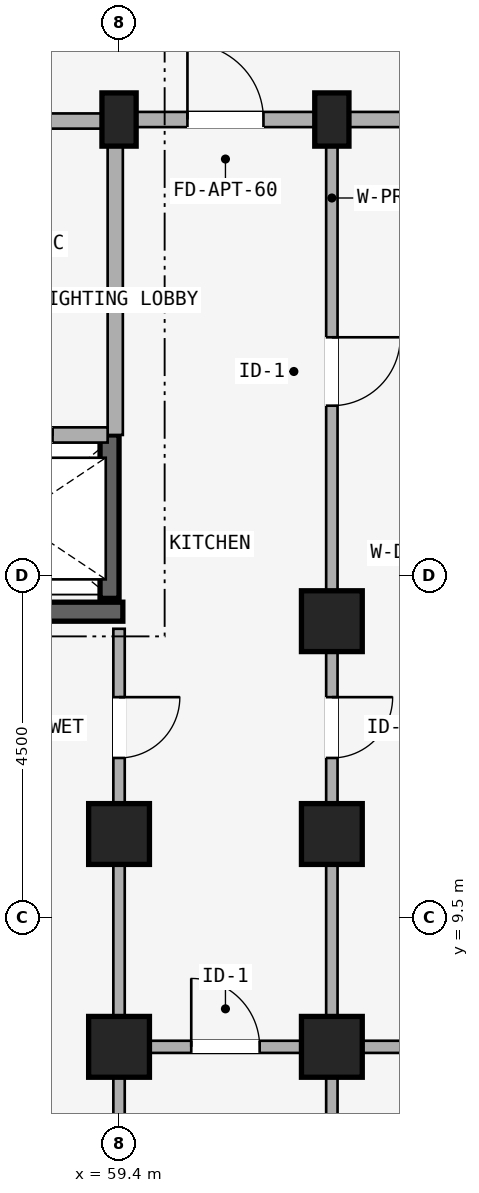
"""IFC4 building model, lengths in metres.
Left out: names, types, materials, properties, quantities, classifications, styles, units other than length and angle.
Written with IfcOpenShell. Run it as: python <this file> out.ifc"""

import sys

from ifc_helpers import new_model, si_unit, direction, frame, frame_2d, origin, origin_2d, place, context, subcontext, project, spatial, rectangle, extrude, element, fill, save


model = new_model("IFC4")
c1 = context("Model", 3, precision=1e-05, world=origin(), true_north=direction((0.0, 1.0)))
c2 = subcontext(c1, "Body", "Model", "MODEL_VIEW")
j1 = project(units=[si_unit("LENGTHUNIT", "METRE"), si_unit("PLANEANGLEUNIT", "RADIAN")], contexts=[c1])
p1 = place(None, origin())
s1 = spatial("IfcSite", under=j1, at=p1, CompositionType="ELEMENT")
p2 = place(p1, origin())
s2 = spatial("IfcBuilding", under=s1, at=p2, CompositionType="ELEMENT")
p3 = place(p2, frame((0.0, 0.0, 11.85)))
s3 = spatial("IfcBuildingStorey", under=s2, at=p3, CompositionType="ELEMENT", Elevation=11.85)
p4 = place(p3, frame((56.65, 13.525, 0.0), z_axis=(0.0, 0.0, 1.0), x_axis=(1.0, 0.0, 0.0)))
e1 = element("IfcWall", 1, at=p4, inside=s3, PredefinedType="SHEAR", context=c2, shape_type="SweptSolid", body=[
    extrude(rectangle(XDim=2.8, YDim=0.25, at=frame_2d((1.4, 0.0))), origin(), (0.0, 0.0, 1.0), 2.93),
])
p5 = place(p3, frame((59.275, 15.85, 0.0), z_axis=(0.0, 0.0, 1.0), x_axis=(0.0, -1.0, 0.0)))
e2 = element("IfcWall", 2, at=p5, inside=s3, PredefinedType="SHEAR", context=c2, shape_type="SweptSolid", body=[
    extrude(rectangle(XDim=2.15, YDim=0.25, at=frame_2d((1.075, 0.0))), origin(), (0.0, 0.0, 1.0), 2.93),
])
p6 = place(p3, frame((59.4, 20.0, 0.0), z_axis=(0.0, 0.0, 1.0), x_axis=(1.0, 0.0, 0.0)))
e3 = element("IfcColumn", 3, at=p6, inside=s3, PredefinedType="COLUMN", context=c2, shape_type="SweptSolid", body=[
    extrude(rectangle(XDim=0.45, YDim=0.7, at=origin_2d()), origin(), (0.0, 0.0, 1.0), 2.93),
])
for number, where, z_axis, x_axis in (
    (4, (59.4, 10.6, 0.0), (0.0, 0.0, 1.0), (1.0, 0.0, 0.0)),
    (5, (59.4, 7.8, 0.0), (0.0, 0.0, 1.0), (1.0, 0.0, 0.0)),
):
    element("IfcColumn", number, at=place(p3, frame(where, z_axis=z_axis, x_axis=x_axis)), inside=s3, PredefinedType="COLUMN", context=c2, shape_type="SweptSolid", body=[
        extrude(rectangle(XDim=0.8, YDim=0.8, at=origin_2d()), origin(), (0.0, 0.0, 1.0), 2.93),
    ])
p7 = place(p3, frame((62.2, 20.0, 0.0), z_axis=(0.0, 0.0, 1.0), x_axis=(1.0, 0.0, 0.0)))
e6 = element("IfcColumn", 6, at=p7, inside=s3, PredefinedType="COLUMN", context=c2, shape_type="SweptSolid", body=[
    extrude(rectangle(XDim=0.45, YDim=0.7, at=origin_2d()), origin(), (0.0, 0.0, 1.0), 2.93),
])
for number, where, z_axis, x_axis in (
    (7, (62.2, 13.4, 0.0), (0.0, 0.0, 1.0), (1.0, 0.0, 0.0)),
    (8, (62.2, 10.6, 0.0), (0.0, 0.0, 1.0), (1.0, 0.0, 0.0)),
    (9, (62.2, 7.8, 0.0), (0.0, 0.0, 1.0), (1.0, 0.0, 0.0)),
):
    element("IfcColumn", number, at=place(p3, frame(where, z_axis=z_axis, x_axis=x_axis)), inside=s3, PredefinedType="COLUMN", context=c2, shape_type="SweptSolid", body=[
        extrude(rectangle(XDim=0.8, YDim=0.8, at=origin_2d()), origin(), (0.0, 0.0, 1.0), 2.93),
    ])
p8 = place(p3, frame((53.7, 19.98, 0.0), z_axis=(0.0, 0.0, 1.0), x_axis=(1.0, 0.0, 0.0)))
e10 = element("IfcWall", 10, at=p8, inside=s3, PredefinedType="STANDARD", context=c2, shape_type="SweptSolid", body=[
    extrude(rectangle(XDim=5.65, YDim=0.2, at=frame_2d((2.825, 0.0))), origin(), (0.0, 0.0, 1.0), 2.372),
])
p9 = place(p8, frame((1.923, 0.0, 0.0)))
e11 = element("IfcOpeningElement", 11, at=p9, cuts=e10, PredefinedType="OPENING", context=c2, shape_type="SweptSolid", body=[
    extrude(rectangle(XDim=1.24, YDim=2.15, at=frame_2d((0.62, 1.075))), frame((0.0, 0.11, 0.0), z_axis=(0.0, -1.0, 0.0), x_axis=(1.0, 0.0, 0.0)), (0.0, 0.0, 1.0), 0.22),
])
p10 = place(p3, frame((59.35, 19.98, 0.0), z_axis=(0.0, 0.0, 1.0), x_axis=(0.0, -1.0, 0.0)))
e12 = element("IfcWall", 12, at=p10, inside=s3, PredefinedType="STANDARD", context=c2, shape_type="SweptSolid", body=[
    extrude(rectangle(XDim=4.13, YDim=0.2, at=frame_2d((2.065, 0.0))), origin(), (0.0, 0.0, 1.0), 2.372),
])
p11 = place(p3, frame((56.7, 15.85, 0.0), z_axis=(0.0, 0.0, 1.0), x_axis=(1.0, 0.0, 0.0)))
e13 = element("IfcWall", 13, at=p11, inside=s3, PredefinedType="STANDARD", context=c2, shape_type="SweptSolid", body=[
    extrude(rectangle(XDim=2.55, YDim=0.2, at=frame_2d((1.275, 0.0))), origin(), (0.0, 0.0, 1.0), 2.372),
])
p12 = place(p11, frame((0.725, 0.0, 0.0)))
e14 = element("IfcOpeningElement", 14, at=p12, cuts=e13, PredefinedType="OPENING", context=c2, shape_type="SweptSolid", body=[
    extrude(rectangle(XDim=1.1, YDim=2.15, at=frame_2d((0.55, 1.075))), frame((0.0, 0.11, 0.0), z_axis=(0.0, -1.0, 0.0), x_axis=(1.0, 0.0, 0.0)), (0.0, 0.0, 1.0), 0.22),
])
p13 = place(p3, frame((59.4, 20.0, 0.0), z_axis=(0.0, 0.0, 1.0), x_axis=(1.0, 0.0, 0.0)))
e15 = element("IfcWall", 15, at=p13, inside=s3, PredefinedType="STANDARD", context=c2, shape_type="SweptSolid", body=[
    extrude(rectangle(XDim=2.8, YDim=0.2, at=frame_2d((1.4, 0.0))), origin(), (0.0, 0.0, 1.0), 2.372),
])
p14 = place(p13, frame((0.9, 0.0, 0.0)))
e16 = element("IfcOpeningElement", 16, at=p14, cuts=e15, PredefinedType="OPENING", context=c2, shape_type="SweptSolid", body=[
    extrude(rectangle(XDim=1.0, YDim=2.15, at=frame_2d((0.5, 1.075))), frame((0.0, 0.11, 0.0), z_axis=(0.0, -1.0, 0.0), x_axis=(1.0, 0.0, 0.0)), (0.0, 0.0, 1.0), 0.22),
])
p15 = place(p3, frame((59.48, 7.8, 0.0), z_axis=(0.0, 0.0, 1.0), x_axis=(1.0, 0.0, 0.0)))
e17 = element("IfcWall", 17, at=p15, inside=s3, PredefinedType="PLUMBINGWALL", context=c2, shape_type="SweptSolid", body=[
    extrude(rectangle(XDim=2.64, YDim=0.16, at=frame_2d((1.32, 0.0))), origin(), (0.0, 0.0, 1.0), 2.372),
])
p16 = place(p15, frame((0.87, 0.0, 0.0)))
e18 = element("IfcOpeningElement", 18, at=p16, cuts=e17, PredefinedType="OPENING", context=c2, shape_type="SweptSolid", body=[
    extrude(rectangle(XDim=0.9, YDim=2.1, at=frame_2d((0.45, 1.05))), frame((0.0, 0.09, 0.0), z_axis=(0.0, -1.0, 0.0), x_axis=(1.0, 0.0, 0.0)), (0.0, 0.0, 1.0), 0.18),
])
p17 = place(p3, frame((62.2, 20.0, 0.0), z_axis=(0.0, 0.0, 1.0), x_axis=(1.0, 0.0, 0.0)))
e19 = element("IfcWall", 19, at=p17, inside=s3, PredefinedType="STANDARD", context=c2, shape_type="SweptSolid", body=[
    extrude(rectangle(XDim=2.8, YDim=0.2, at=frame_2d((1.4, 0.0))), origin(), (0.0, 0.0, 1.0), 2.372),
])
p18 = place(p3, frame((62.28, 7.8, 0.0), z_axis=(0.0, 0.0, 1.0), x_axis=(1.0, 0.0, 0.0)))
e20 = element("IfcWall", 20, at=p18, inside=s3, PredefinedType="PLUMBINGWALL", context=c2, shape_type="SweptSolid", body=[
    extrude(rectangle(XDim=2.64, YDim=0.16, at=frame_2d((1.32, 0.0))), origin(), (0.0, 0.0, 1.0), 2.372),
])
p19 = place(p18, frame((0.92, 0.0, 0.0)))
e21 = element("IfcOpeningElement", 21, at=p19, cuts=e20, PredefinedType="OPENING", context=c2, shape_type="SweptSolid", body=[
    extrude(rectangle(XDim=0.8, YDim=2.1, at=frame_2d((0.4, 1.05))), frame((0.0, 0.09, 0.0), z_axis=(0.0, -1.0, 0.0), x_axis=(1.0, 0.0, 0.0)), (0.0, 0.0, 1.0), 0.18),
])
p20 = place(p3, frame((59.4, 13.3, 0.0), z_axis=(0.0, 0.0, 1.0), x_axis=(0.0, -1.0, 0.0)))
e22 = element("IfcWall", 22, at=p20, inside=s3, PredefinedType="PARTITIONING", context=c2, shape_type="SweptSolid", body=[
    extrude(rectangle(XDim=10.82, YDim=0.15, at=frame_2d((5.41, 0.0))), origin(), (0.0, 0.0, 1.0), 2.372),
])
p21 = place(p20, frame((0.899, 0.0, 0.0)))
e23 = element("IfcOpeningElement", 23, at=p21, cuts=e22, PredefinedType="OPENING", context=c2, shape_type="SweptSolid", body=[
    extrude(rectangle(XDim=0.8, YDim=2.1, at=frame_2d((0.4, 1.05))), frame((0.0, 0.085, 0.0), z_axis=(0.0, -1.0, 0.0), x_axis=(1.0, 0.0, 0.0)), (0.0, 0.0, 1.0), 0.17),
])
p22 = place(p3, frame((62.2, 19.95, 0.0), z_axis=(0.0, 0.0, 1.0), x_axis=(0.0, -1.0, 0.0)))
e24 = element("IfcWall", 24, at=p22, inside=s3, PredefinedType="PARTITIONING", context=c2, shape_type="SweptSolid", body=[
    extrude(rectangle(XDim=6.53, YDim=0.15, at=frame_2d((3.265, 0.0))), origin(), (0.0, 0.0, 1.0), 2.372),
])
p23 = place(p22, frame((2.815, 0.0, 0.0)))
e25 = element("IfcOpeningElement", 25, at=p23, cuts=e24, PredefinedType="OPENING", context=c2, shape_type="SweptSolid", body=[
    extrude(rectangle(XDim=0.9, YDim=2.1, at=frame_2d((0.45, 1.05))), frame((0.0, 0.085, 0.0), z_axis=(0.0, -1.0, 0.0), x_axis=(1.0, 0.0, 0.0)), (0.0, 0.0, 1.0), 0.17),
])
p24 = place(p3, frame((62.2, 13.3, 0.0), z_axis=(0.0, 0.0, 1.0), x_axis=(0.0, -1.0, 0.0)))
e26 = element("IfcWall", 26, at=p24, inside=s3, PredefinedType="PARTITIONING", context=c2, shape_type="SweptSolid", body=[
    extrude(rectangle(XDim=10.82, YDim=0.15, at=frame_2d((5.41, 0.0))), origin(), (0.0, 0.0, 1.0), 2.372),
])
p25 = place(p24, frame((0.899, 0.0, 0.0)))
e27 = element("IfcOpeningElement", 27, at=p25, cuts=e26, PredefinedType="OPENING", context=c2, shape_type="SweptSolid", body=[
    extrude(rectangle(XDim=0.8, YDim=2.1, at=frame_2d((0.4, 1.05))), frame((0.0, 0.085, 0.0), z_axis=(0.0, -1.0, 0.0), x_axis=(1.0, 0.0, 0.0)), (0.0, 0.0, 1.0), 0.17),
])
p26 = place(p12, origin())
e28 = element("IfcDoor", 28, at=p26, inside=s3, OperationType="SLIDING_TO_LEFT", PredefinedType="DOOR", context=c2, shape_type="SweptSolid", body=[
    extrude(rectangle(XDim=1.1, YDim=2.15, at=frame_2d((0.55, 1.075))), frame((0.0, 0.025, 0.0), z_axis=(0.0, -1.0, 0.0), x_axis=(1.0, 0.0, 0.0)), (0.0, 0.0, 1.0), 0.05),
])
fill(e14, e28)
p27 = place(p16, frame((0.9, 0.0, 0.0), z_axis=(0.0, 0.0, 1.0), x_axis=(-1.0, 0.0, 0.0)))
e29 = element("IfcDoor", 29, at=p27, inside=s3, OperationType="SINGLE_SWING_RIGHT", PredefinedType="DOOR", context=c2, shape_type="SweptSolid", body=[
    extrude(rectangle(XDim=0.9, YDim=2.1, at=frame_2d((0.45, 1.05))), frame((0.0, 0.025, 0.0), z_axis=(0.0, -1.0, 0.0), x_axis=(1.0, 0.0, 0.0)), (0.0, 0.0, 1.0), 0.05),
])
fill(e18, e29)
p28 = place(p14, origin())
e30 = element("IfcDoor", 30, at=p28, inside=s3, OperationType="SINGLE_SWING_LEFT", PredefinedType="DOOR", context=c2, shape_type="SweptSolid", body=[
    extrude(rectangle(XDim=1.0, YDim=2.15, at=frame_2d((0.5, 1.075))), frame((0.0, 0.025, 0.0), z_axis=(0.0, -1.0, 0.0), x_axis=(1.0, 0.0, 0.0)), (0.0, 0.0, 1.0), 0.05),
])
fill(e16, e30)
p29 = place(p21, origin())
e31 = element("IfcDoor", 31, at=p29, inside=s3, OperationType="SINGLE_SWING_LEFT", PredefinedType="DOOR", context=c2, shape_type="SweptSolid", body=[
    extrude(rectangle(XDim=0.8, YDim=2.1, at=frame_2d((0.4, 1.05))), frame((0.0, 0.025, 0.0), z_axis=(0.0, -1.0, 0.0), x_axis=(1.0, 0.0, 0.0)), (0.0, 0.0, 1.0), 0.05),
])
fill(e23, e31)
p30 = place(p23, origin())
e32 = element("IfcDoor", 32, at=p30, inside=s3, OperationType="SINGLE_SWING_LEFT", PredefinedType="DOOR", context=c2, shape_type="SweptSolid", body=[
    extrude(rectangle(XDim=0.9, YDim=2.1, at=frame_2d((0.45, 1.05))), frame((0.0, 0.025, 0.0), z_axis=(0.0, -1.0, 0.0), x_axis=(1.0, 0.0, 0.0)), (0.0, 0.0, 1.0), 0.05),
])
fill(e25, e32)
p31 = place(p25, frame((0.8, 0.0, 0.0), z_axis=(0.0, 0.0, 1.0), x_axis=(-1.0, 0.0, 0.0)))
e33 = element("IfcDoor", 33, at=p31, inside=s3, OperationType="SINGLE_SWING_RIGHT", PredefinedType="DOOR", context=c2, shape_type="SweptSolid", body=[
    extrude(rectangle(XDim=0.8, YDim=2.1, at=frame_2d((0.4, 1.05))), frame((0.0, 0.025, 0.0), z_axis=(0.0, -1.0, 0.0), x_axis=(1.0, 0.0, 0.0)), (0.0, 0.0, 1.0), 0.05),
])
fill(e27, e33)
save(model, sys.argv[1])
